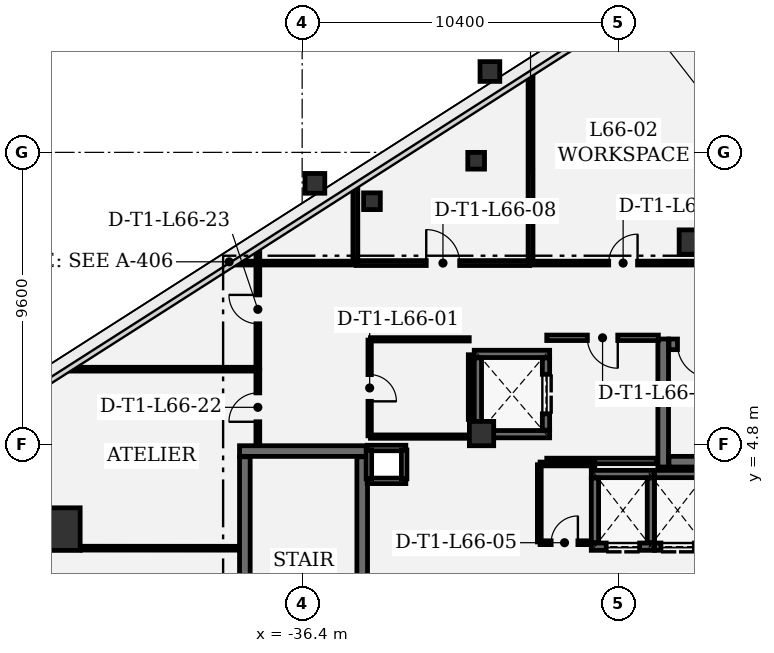
"""IFC4 building model, lengths in metres.
Left out: names, types, materials, properties, quantities, classifications, styles, units other than length and angle.
Written with IfcOpenShell. Run it as: python <this file> out.ifc"""

import sys

from ifc_helpers import new_model, si_unit, direction, frame, frame_2d, origin, origin_2d, place, context, subcontext, project, spatial, rectangle, extrude, element, fill, save


model = new_model("IFC4")
c1 = context("Model", 3, precision=1e-05, world=origin(), true_north=direction((0.0, 1.0)))
c2 = subcontext(c1, "Body", "Model", "MODEL_VIEW")
j1 = project(units=[si_unit("LENGTHUNIT", "METRE"), si_unit("PLANEANGLEUNIT", "RADIAN")], contexts=[c1])
p1 = place(None, origin())
s1 = spatial("IfcSite", under=j1, at=p1, CompositionType="ELEMENT")
p2 = place(p1, origin())
s2 = spatial("IfcBuilding", under=s1, at=p2, CompositionType="ELEMENT")
p3 = place(p2, frame((0.0, 0.0, 285.0)))
s3 = spatial("IfcBuildingStorey", under=s2, at=p3, CompositionType="ELEMENT", Elevation=285.0)
p4 = place(p3, frame((-44.403, 2.008, 0.0), z_axis=(0.0, 0.0, 1.0), x_axis=(1.0, 0.0, 0.0)))
e1 = element("IfcColumn", 1, at=p4, inside=s3, PredefinedType="COLUMN", context=c2, shape_type="SweptSolid", body=[
    extrude(rectangle(XDim=1.4, YDim=1.4, at=origin_2d()), origin(), (0.0, 0.0, 1.0), 4.2),
])
for number, where, z_axis, x_axis in (
    (2, (-23.6, 11.45, 0.0), (0.0, 0.0, 1.0), (1.0, 0.0, 0.0)),
    (3, (-30.5, 5.15, 0.0), (0.0, 0.0, 1.0), (1.0, 0.0, 0.0)),
):
    element("IfcColumn", number, at=place(p3, frame(where, z_axis=z_axis, x_axis=x_axis)), inside=s3, PredefinedType="COLUMN", context=c2, shape_type="SweptSolid", body=[
        extrude(rectangle(XDim=0.8, YDim=0.8, at=origin_2d()), origin(), (0.0, 0.0, 1.0), 4.2),
    ])
for number, where, z_axis, x_axis in (
    (4, (-35.981, 13.381, 0.0), (0.0, 0.0, 1.0), (1.0, 0.0, 0.0)),
    (5, (-30.225, 17.06, 0.0), (0.0, 0.0, 1.0), (1.0, 0.0, 0.0)),
):
    element("IfcColumn", number, at=place(p3, frame(where, z_axis=z_axis, x_axis=x_axis)), inside=s3, PredefinedType="COLUMN", context=c2, shape_type="SweptSolid", body=[
        extrude(rectangle(XDim=0.65, YDim=0.65, at=origin_2d()), origin(), (0.0, 0.0, 1.0), 4.2),
    ])
for number, where, z_axis, x_axis in (
    (6, (-34.104, 12.792, 0.0), (0.0, 0.0, 1.0), (1.0, 0.0, 0.0)),
    (7, (-30.677, 14.124, 0.0), (0.0, 0.0, 1.0), (1.0, 0.0, 0.0)),
):
    element("IfcColumn", number, at=place(p3, frame(where, z_axis=z_axis, x_axis=x_axis)), inside=s3, PredefinedType="COLUMN", context=c2, shape_type="SweptSolid", body=[
        extrude(rectangle(XDim=0.55, YDim=0.55, at=origin_2d()), origin(), (0.0, 0.0, 1.0), 4.2),
    ])
p5 = place(p3, frame((-24.525, 8.26, 0.0), z_axis=(0.0, 0.0, 1.0), x_axis=(0.0, -1.0, 0.0)))
e8 = element("IfcWall", 8, at=p5, inside=s3, PredefinedType="SHEAR", context=c2, shape_type="SweptSolid", body=[
    extrude(rectangle(XDim=4.21, YDim=0.35, at=frame_2d((2.105, 0.0))), origin(), (0.0, 0.0, 1.0), 3.91),
])
p6 = place(p3, frame((-24.335, 4.225, 0.0), z_axis=(0.0, 0.0, 1.0), x_axis=(1.0, 0.0, 0.0)))
e9 = element("IfcWall", 9, at=p6, inside=s3, PredefinedType="SHEAR", context=c2, shape_type="SweptSolid", body=[
    extrude(rectangle(XDim=8.12, YDim=0.35, at=frame_2d((4.06, 0.0))), origin(), (0.0, 0.0, 1.0), 3.91),
])
p7 = place(p3, frame((-16.215, 8.085, 0.0), z_axis=(0.0, 0.0, 1.0), x_axis=(-1.0, 0.0, 0.0)))
e10 = element("IfcWall", 10, at=p7, inside=s3, PredefinedType="SHEAR", context=c2, shape_type="SweptSolid", body=[
    extrude(rectangle(XDim=8.12, YDim=0.35, at=frame_2d((4.06, 0.0))), origin(), (0.0, 0.0, 1.0), 3.91),
])
p8 = place(p7, frame((6.74, 0.0, 0.0)))
e11 = element("IfcOpeningElement", 11, at=p8, cuts=e10, PredefinedType="OPENING", context=c2, shape_type="SweptSolid", body=[
    extrude(rectangle(XDim=1.1, YDim=2.2, at=frame_2d((0.55, 1.1))), frame((0.0, 0.185, 0.0), z_axis=(0.0, -1.0, 0.0), x_axis=(1.0, 0.0, 0.0)), (0.0, 0.0, 1.0), 0.37),
])
p9 = place(p3, frame((-34.25, 4.575, 0.0), z_axis=(0.0, 0.0, 1.0), x_axis=(-1.0, 0.0, 0.0)))
e12 = element("IfcWall", 12, at=p9, inside=s3, PredefinedType="SHEAR", context=c2, shape_type="SweptSolid", body=[
    extrude(rectangle(XDim=4.21, YDim=0.35, at=frame_2d((2.105, 0.0))), origin(), (0.0, 0.0, 1.0), 3.91),
])
for number, where, z_axis, x_axis in (
    (13, (-34.425, -4.385, 0.0), (0.0, 0.0, 1.0), (0.0, 1.0, 0.0)),
    (14, (-38.285, 4.385, 0.0), (0.0, 0.0, 1.0), (0.0, -1.0, 0.0)),
):
    element("IfcWall", number, at=place(p3, frame(where, z_axis=z_axis, x_axis=x_axis)), inside=s3, PredefinedType="SHEAR", context=c2, shape_type="SweptSolid", body=[
        extrude(rectangle(XDim=8.77, YDim=0.35, at=frame_2d((4.385, 0.0))), origin(), (0.0, 0.0, 1.0), 3.91),
    ])
for number, where, z_axis, x_axis in (
    (15, (-28.26, 5.13, 0.0), (0.0, 0.0, 1.0), (-1.0, 0.0, 0.0)),
    (16, (-30.74, 7.77, 0.0), (0.0, 0.0, 1.0), (1.0, 0.0, 0.0)),
):
    element("IfcWall", number, at=place(p3, frame(where, z_axis=z_axis, x_axis=x_axis)), inside=s3, PredefinedType="SHEAR", context=c2, shape_type="SweptSolid", body=[
        extrude(rectangle(XDim=2.48, YDim=0.24, at=frame_2d((1.24, 0.0))), origin(), (0.0, 0.0, 1.0), 3.91),
    ])
p10 = place(p3, frame((-30.62, 5.262, 0.0), z_axis=(0.0, 0.0, 1.0), x_axis=(0.0, 1.0, 0.0)))
e17 = element("IfcWall", 17, at=p10, inside=s3, PredefinedType="SHEAR", context=c2, shape_type="SweptSolid", body=[
    extrude(rectangle(XDim=2.376, YDim=0.24, at=frame_2d((1.188, 0.0))), origin(), (0.0, 0.0, 1.0), 3.91),
])
p11 = place(p3, frame((-28.38, 7.638, 0.0), z_axis=(0.0, 0.0, 1.0), x_axis=(0.0, -1.0, 0.0)))
e18 = element("IfcWall", 18, at=p11, inside=s3, PredefinedType="SHEAR", context=c2, shape_type="SweptSolid", body=[
    extrude(rectangle(XDim=2.376, YDim=0.24, at=frame_2d((1.188, 0.0))), origin(), (0.0, 0.0, 1.0), 3.91),
])
p12 = place(p11, frame((0.538, 0.0, 0.0)))
e19 = element("IfcOpeningElement", 19, at=p12, cuts=e18, PredefinedType="OPENING", context=c2, shape_type="SweptSolid", body=[
    extrude(rectangle(XDim=1.3, YDim=2.3, at=frame_2d((0.65, 1.15))), frame((0.0, 0.13, 0.0), z_axis=(0.0, -1.0, 0.0), x_axis=(1.0, 0.0, 0.0)), (0.0, 0.0, 1.0), 0.26),
])
p13 = place(p3, frame((-24.81, 1.43, 0.0), z_axis=(0.0, 0.0, 1.0), x_axis=(-1.0, 0.0, 0.0)))
e20 = element("IfcWall", 20, at=p13, inside=s3, PredefinedType="SHEAR", context=c2, shape_type="SweptSolid", body=[
    extrude(rectangle(XDim=2.08, YDim=0.24, at=frame_2d((1.04, 0.0))), origin(), (0.0, 0.0, 1.0), 3.91),
])
p14 = place(p13, frame((0.49, 0.0, 0.0)))
e21 = element("IfcOpeningElement", 21, at=p14, cuts=e20, PredefinedType="OPENING", context=c2, shape_type="SweptSolid", body=[
    extrude(rectangle(XDim=1.1, YDim=2.2, at=frame_2d((0.55, 1.1))), frame((0.0, 0.13, 0.0), z_axis=(0.0, -1.0, 0.0), x_axis=(1.0, 0.0, 0.0)), (0.0, 0.0, 1.0), 0.26),
])
p15 = place(p3, frame((-26.89, 3.82, 0.0), z_axis=(0.0, 0.0, 1.0), x_axis=(1.0, 0.0, 0.0)))
e22 = element("IfcWall", 22, at=p15, inside=s3, PredefinedType="SHEAR", context=c2, shape_type="SweptSolid", body=[
    extrude(rectangle(XDim=2.08, YDim=0.24, at=frame_2d((1.04, 0.0))), origin(), (0.0, 0.0, 1.0), 3.91),
])
for number, where, z_axis, x_axis in (
    (23, (-26.77, 1.562, 0.0), (0.0, 0.0, 1.0), (0.0, 1.0, 0.0)),
    (24, (-24.93, 3.688, 0.0), (0.0, 0.0, 1.0), (0.0, -1.0, 0.0)),
):
    element("IfcWall", number, at=place(p3, frame(where, z_axis=z_axis, x_axis=x_axis)), inside=s3, PredefinedType="SHEAR", context=c2, shape_type="SweptSolid", body=[
        extrude(rectangle(XDim=2.126, YDim=0.24, at=frame_2d((1.063, 0.0))), origin(), (0.0, 0.0, 1.0), 3.91),
    ])
p16 = place(p3, frame((-23.01, 1.43, 0.0), z_axis=(0.0, 0.0, 1.0), x_axis=(-1.0, 0.0, 0.0)))
e25 = element("IfcWall", 25, at=p16, inside=s3, PredefinedType="SHEAR", context=c2, shape_type="SweptSolid", body=[
    extrude(rectangle(XDim=1.8, YDim=0.24, at=frame_2d((0.9, 0.0))), origin(), (0.0, 0.0, 1.0), 3.91),
])
p17 = place(p16, frame((0.49, 0.0, 0.0)))
e26 = element("IfcOpeningElement", 26, at=p17, cuts=e25, PredefinedType="OPENING", context=c2, shape_type="SweptSolid", body=[
    extrude(rectangle(XDim=1.1, YDim=2.2, at=frame_2d((0.55, 1.1))), frame((0.0, 0.13, 0.0), z_axis=(0.0, -1.0, 0.0), x_axis=(1.0, 0.0, 0.0)), (0.0, 0.0, 1.0), 0.26),
])
p18 = place(p3, frame((-24.81, 3.82, 0.0), z_axis=(0.0, 0.0, 1.0), x_axis=(1.0, 0.0, 0.0)))
e27 = element("IfcWall", 27, at=p18, inside=s3, PredefinedType="SHEAR", context=c2, shape_type="SweptSolid", body=[
    extrude(rectangle(XDim=1.8, YDim=0.24, at=frame_2d((0.9, 0.0))), origin(), (0.0, 0.0, 1.0), 3.91),
])
for number, where, z_axis, x_axis in (
    (28, (-32.99, 3.595, 0.0), (0.0, 0.0, 1.0), (-1.0, 0.0, 0.0)),
    (29, (-34.26, 4.675, 0.0), (0.0, 0.0, 1.0), (1.0, 0.0, 0.0)),
):
    element("IfcWall", number, at=place(p3, frame(where, z_axis=z_axis, x_axis=x_axis)), inside=s3, PredefinedType="PARTITIONING", context=c2, shape_type="SweptSolid", body=[
        extrude(rectangle(XDim=1.27, YDim=0.18, at=frame_2d((0.635, 0.0))), origin(), (0.0, 0.0, 1.0), 3.91),
    ])
for number, where, z_axis, x_axis in (
    (30, (-34.205, 3.66, 0.0), (0.0, 0.0, 1.0), (0.0, 1.0, 0.0)),
    (31, (-33.045, 4.61, 0.0), (0.0, 0.0, 1.0), (0.0, -1.0, 0.0)),
):
    element("IfcWall", number, at=place(p3, frame(where, z_axis=z_axis, x_axis=x_axis)), inside=s3, PredefinedType="PARTITIONING", context=c2, shape_type="SweptSolid", body=[
        extrude(rectangle(XDim=0.95, YDim=0.18, at=frame_2d((0.475, 0.0))), origin(), (0.0, 0.0, 1.0), 3.91),
    ])
p19 = place(p3, frame((-28.355, 4.25, 0.0), z_axis=(0.0, 0.0, 1.0), x_axis=(1.0, 0.0, 0.0)))
e32 = element("IfcWall", 32, at=p19, inside=s3, PredefinedType="PARTITIONING", context=c2, shape_type="SweptSolid", body=[
    extrude(rectangle(XDim=3.622, YDim=0.18, at=frame_2d((1.811, 0.0))), origin(), (0.0, 0.0, 1.0), 3.91),
])
p20 = place(p3, frame((-24.684, 8.3, 0.0), z_axis=(0.0, 0.0, 1.0), x_axis=(-1.0, 0.0, 0.0)))
e33 = element("IfcWall", 33, at=p20, inside=s3, PredefinedType="PARTITIONING", context=c2, shape_type="SweptSolid", body=[
    extrude(rectangle(XDim=3.671, YDim=0.18, at=frame_2d((1.835, 0.0))), origin(), (0.0, 0.0, 1.0), 3.529),
])
p21 = place(p20, frame((1.335, 0.0, 0.0)))
e34 = element("IfcOpeningElement", 34, at=p21, cuts=e33, PredefinedType="OPENING", context=c2, shape_type="SweptSolid", body=[
    extrude(rectangle(XDim=1.0, YDim=2.15, at=frame_2d((0.5, 1.075))), frame((0.0, 0.1, 0.0), z_axis=(0.0, -1.0, 0.0), x_axis=(1.0, 0.0, 0.0)), (0.0, 0.0, 1.0), 0.2),
])
p22 = place(p3, frame((-34.18, 8.225, 0.0), z_axis=(0.0, 0.0, 1.0), x_axis=(0.0, -1.0, 0.0)))
e35 = element("IfcWall", 35, at=p22, inside=s3, PredefinedType="PARTITIONING", context=c2, shape_type="SweptSolid", body=[
    extrude(rectangle(XDim=3.15, YDim=0.11, at=frame_2d((1.575, 0.0))), origin(), (0.0, 0.0, 1.0), 3.91),
])
p23 = place(p22, frame((1.135, 0.0, 0.0)))
e36 = element("IfcOpeningElement", 36, at=p23, cuts=e35, PredefinedType="OPENING", context=c2, shape_type="SweptSolid", body=[
    extrude(rectangle(XDim=0.88, YDim=2.1, at=frame_2d((0.44, 1.05))), frame((0.0, 0.065, 0.0), z_axis=(0.0, -1.0, 0.0), x_axis=(1.0, 0.0, 0.0)), (0.0, 0.0, 1.0), 0.13),
])
p24 = place(p3, frame((-34.155, 5.05, 0.0), z_axis=(0.0, 0.0, 1.0), x_axis=(1.0, 0.0, 0.0)))
e37 = element("IfcWall", 37, at=p24, inside=s3, PredefinedType="PARTITIONING", context=c2, shape_type="SweptSolid", body=[
    extrude(rectangle(XDim=3.19, YDim=0.11, at=frame_2d((1.595, 0.0))), origin(), (0.0, 0.0, 1.0), 3.91),
])
p25 = place(p3, frame((-30.88, 5.615, 0.0), z_axis=(0.0, 0.0, 1.0), x_axis=(0.0, 1.0, 0.0)))
e38 = element("IfcWall", 38, at=p25, inside=s3, PredefinedType="PARTITIONING", context=c2, shape_type="SweptSolid", body=[
    extrude(rectangle(XDim=2.128, YDim=0.11, at=frame_2d((1.064, 0.0))), origin(), (0.0, 0.0, 1.0), 3.91),
])
p26 = place(p3, frame((-30.905, 8.25, 0.0), z_axis=(0.0, 0.0, 1.0), x_axis=(-1.0, 0.0, 0.0)))
e39 = element("IfcWall", 39, at=p26, inside=s3, PredefinedType="PARTITIONING", context=c2, shape_type="SweptSolid", body=[
    extrude(rectangle(XDim=3.25, YDim=0.11, at=frame_2d((1.625, 0.0))), origin(), (0.0, 0.0, 1.0), 3.13),
])
p27 = place(p3, frame((-28.6, 4.125, 0.0), z_axis=(0.0, 0.0, 1.0), x_axis=(0.0, -1.0, 0.0)))
e40 = element("IfcWall", 40, at=p27, inside=s3, PredefinedType="PARTITIONING", context=c2, shape_type="SweptSolid", body=[
    extrude(rectangle(XDim=2.54, YDim=0.125, at=frame_2d((1.27, 0.0))), origin(), (0.0, 0.0, 1.0), 3.91),
])
p28 = place(p3, frame((-28.575, 1.56, 0.0), z_axis=(0.0, 0.0, 1.0), x_axis=(1.0, 0.0, 0.0)))
e41 = element("IfcWall", 41, at=p28, inside=s3, PredefinedType="PARTITIONING", context=c2, shape_type="SweptSolid", body=[
    extrude(rectangle(XDim=1.609, YDim=0.125, at=frame_2d((0.805, 0.0))), origin(), (0.0, 0.0, 1.0), 3.91),
])
p29 = place(p28, frame((0.365, 0.0, 0.0)))
e42 = element("IfcOpeningElement", 42, at=p29, cuts=e41, PredefinedType="OPENING", context=c2, shape_type="SweptSolid", body=[
    extrude(rectangle(XDim=0.88, YDim=2.1, at=frame_2d((0.44, 1.05))), frame((0.0, 0.073, 0.0), z_axis=(0.0, -1.0, 0.0), x_axis=(1.0, 0.0, 0.0)), (0.0, 0.0, 1.0), 0.145),
])
p30 = place(p3, frame((-26.775, 4.15, 0.0), z_axis=(0.0, 0.0, 1.0), x_axis=(-1.0, 0.0, 0.0)))
e43 = element("IfcWall", 43, at=p30, inside=s3, PredefinedType="PARTITIONING", context=c2, shape_type="SweptSolid", body=[
    extrude(rectangle(XDim=1.8, YDim=0.125, at=frame_2d((0.9, 0.0))), origin(), (0.0, 0.0, 1.0), 3.91),
])
p31 = place(p3, frame((-34.625, 10.758, 0.0), z_axis=(0.0, 0.0, 1.0), x_axis=(1.0, 0.0, 0.0)))
e44 = element("IfcWall", 44, at=p31, inside=s3, PredefinedType="PARTITIONING", context=c2, shape_type="SweptSolid", body=[
    extrude(rectangle(XDim=5.712, YDim=0.16, at=frame_2d((2.856, 0.0))), origin(), (0.0, 0.0, 1.0), 3.13),
])
p32 = place(p31, frame((2.306, 0.0, 0.0)))
e45 = element("IfcOpeningElement", 45, at=p32, cuts=e44, PredefinedType="OPENING", context=c2, shape_type="SweptSolid", body=[
    extrude(rectangle(XDim=1.1, YDim=2.15, at=frame_2d((0.55, 1.075))), frame((0.0, 0.09, 0.0), z_axis=(0.0, -1.0, 0.0), x_axis=(1.0, 0.0, 0.0)), (0.0, 0.0, 1.0), 0.18),
])
p33 = place(p3, frame((-28.888, 10.783, 0.0), z_axis=(0.0, 0.0, 1.0), x_axis=(0.0, 1.0, 0.0)))
e46 = element("IfcWall", 46, at=p33, inside=s3, PredefinedType="PARTITIONING", context=c2, shape_type="SweptSolid", body=[
    extrude(rectangle(XDim=6.122, YDim=0.16, at=frame_2d((3.061, 0.0))), origin(), (0.0, 0.0, 1.0), 3.91),
])
p34 = place(p3, frame((-34.65, 13.222, 0.0), z_axis=(0.0, 0.0, 1.0), x_axis=(0.0, -1.0, 0.0)))
e47 = element("IfcWall", 47, at=p34, inside=s3, PredefinedType="PARTITIONING", context=c2, shape_type="SweptSolid", body=[
    extrude(rectangle(XDim=2.439, YDim=0.16, at=frame_2d((1.22, 0.0))), origin(), (0.0, 0.0, 1.0), 3.91),
])
p35 = place(p3, frame((-28.855, 10.758, 0.0), z_axis=(0.0, 0.0, 1.0), x_axis=(1.0, 0.0, 0.0)))
e48 = element("IfcWall", 48, at=p35, inside=s3, PredefinedType="PARTITIONING", context=c2, shape_type="SweptSolid", body=[
    extrude(rectangle(XDim=6.025, YDim=0.125, at=frame_2d((3.012, 0.0))), origin(), (0.0, 0.0, 1.0), 3.13),
])
p36 = place(p35, frame((2.537, 0.0, 0.0)))
e49 = element("IfcOpeningElement", 49, at=p36, cuts=e48, PredefinedType="OPENING", context=c2, shape_type="SweptSolid", body=[
    extrude(rectangle(XDim=0.95, YDim=2.15, at=frame_2d((0.475, 1.075))), frame((0.0, 0.073, 0.0), z_axis=(0.0, -1.0, 0.0), x_axis=(1.0, 0.0, 0.0)), (0.0, 0.0, 1.0), 0.145),
])
p37 = place(p3, frame((-38.493, 1.379, 0.0), z_axis=(0.0, 0.0, 1.0), x_axis=(-0.999999944823, 0.000332194363, 0.0)))
e50 = element("IfcWall", 50, at=p37, inside=s3, PredefinedType="PARTITIONING", context=c2, shape_type="SweptSolid", body=[
    extrude(rectangle(XDim=5.145, YDim=0.125, at=frame_2d((2.572, 0.0))), origin(), (0.0, 0.0, 1.0), 3.91),
])
p38 = place(p3, frame((-37.858, 4.783, 0.0), z_axis=(0.0, 0.0, 1.0), x_axis=(0.0, 1.0, 0.0)))
e51 = element("IfcWall", 51, at=p38, inside=s3, PredefinedType="PARTITIONING", context=c2, shape_type="SweptSolid", body=[
    extrude(rectangle(XDim=2.46, YDim=0.125, at=frame_2d((1.23, 0.0))), origin(), (0.0, 0.0, 1.0), 3.91),
])
p39 = place(p38, frame((0.755, 0.0, 0.0)))
e52 = element("IfcOpeningElement", 52, at=p39, cuts=e51, PredefinedType="OPENING", context=c2, shape_type="SweptSolid", body=[
    extrude(rectangle(XDim=0.95, YDim=2.15, at=frame_2d((0.475, 1.075))), frame((0.0, 0.073, 0.0), z_axis=(0.0, -1.0, 0.0), x_axis=(1.0, 0.0, 0.0)), (0.0, 0.0, 1.0), 0.145),
])
p40 = place(p3, frame((-37.883, 7.268, 0.0), z_axis=(0.0, 0.0, 1.0), x_axis=(-1.0, 0.0, 0.0)))
e53 = element("IfcWall", 53, at=p40, inside=s3, PredefinedType="PARTITIONING", context=c2, shape_type="SweptSolid", body=[
    extrude(rectangle(XDim=6.129, YDim=0.125, at=frame_2d((3.064, 0.0))), origin(), (0.0, 0.0, 1.0), 3.91),
])
p41 = place(p3, frame((-37.858, 7.301, 0.0), z_axis=(0.0, 0.0, 1.0), x_axis=(0.0, 1.0, 0.0)))
e54 = element("IfcWall", 54, at=p41, inside=s3, PredefinedType="PARTITIONING", context=c2, shape_type="SweptSolid", body=[
    extrude(rectangle(XDim=3.872, YDim=0.125, at=frame_2d((1.936, 0.0))), origin(), (0.0, 0.0, 1.0), 3.91),
])
p42 = place(p41, frame((1.461, 0.0, 0.0)))
e55 = element("IfcOpeningElement", 55, at=p42, cuts=e54, PredefinedType="OPENING", context=c2, shape_type="SweptSolid", body=[
    extrude(rectangle(XDim=0.95, YDim=2.15, at=frame_2d((0.475, 1.075))), frame((0.0, 0.073, 0.0), z_axis=(0.0, -1.0, 0.0), x_axis=(1.0, 0.0, 0.0)), (0.0, 0.0, 1.0), 0.145),
])
p43 = place(p3, frame((-34.683, 10.758, 0.0), z_axis=(0.0, 0.0, 1.0), x_axis=(-1.0, 0.0, 0.0)))
e56 = element("IfcWall", 56, at=p43, inside=s3, PredefinedType="PARTITIONING", context=c2, shape_type="SweptSolid", body=[
    extrude(rectangle(XDim=3.868, YDim=0.125, at=frame_2d((1.934, 0.0))), origin(), (0.0, 0.0, 1.0), 3.91),
])
p44 = place(p8, origin())
e57 = element("IfcDoor", 57, at=p44, inside=s3, OperationType="SINGLE_SWING_LEFT", PredefinedType="DOOR", context=c2, shape_type="SweptSolid", body=[
    extrude(rectangle(XDim=1.1, YDim=2.2, at=frame_2d((0.55, 1.1))), frame((0.0, 0.025, 0.0), z_axis=(0.0, -1.0, 0.0), x_axis=(1.0, 0.0, 0.0)), (0.0, 0.0, 1.0), 0.05),
])
fill(e11, e57)
p45 = place(p12, origin())
e58 = element("IfcDoor", 58, at=p45, inside=s3, OperationType="DOUBLE_DOOR_SLIDING", PredefinedType="DOOR", context=c2, shape_type="SweptSolid", body=[
    extrude(rectangle(XDim=1.3, YDim=2.3, at=frame_2d((0.65, 1.15))), frame((0.0, 0.025, 0.0), z_axis=(0.0, -1.0, 0.0), x_axis=(1.0, 0.0, 0.0)), (0.0, 0.0, 1.0), 0.05),
])
fill(e19, e58)
p46 = place(p14, origin())
e59 = element("IfcDoor", 59, at=p46, inside=s3, OperationType="DOUBLE_DOOR_SLIDING", PredefinedType="DOOR", context=c2, shape_type="SweptSolid", body=[
    extrude(rectangle(XDim=1.1, YDim=2.2, at=frame_2d((0.55, 1.1))), frame((0.0, 0.025, 0.0), z_axis=(0.0, -1.0, 0.0), x_axis=(1.0, 0.0, 0.0)), (0.0, 0.0, 1.0), 0.05),
])
fill(e21, e59)
p47 = place(p17, origin())
e60 = element("IfcDoor", 60, at=p47, inside=s3, OperationType="DOUBLE_DOOR_SLIDING", PredefinedType="DOOR", context=c2, shape_type="SweptSolid", body=[
    extrude(rectangle(XDim=1.1, YDim=2.2, at=frame_2d((0.55, 1.1))), frame((0.0, 0.025, 0.0), z_axis=(0.0, -1.0, 0.0), x_axis=(1.0, 0.0, 0.0)), (0.0, 0.0, 1.0), 0.05),
])
fill(e26, e60)
p48 = place(p23, origin())
e61 = element("IfcDoor", 61, at=p48, inside=s3, OperationType="SINGLE_SWING_RIGHT", PredefinedType="DOOR", context=c2, shape_type="SweptSolid", body=[
    extrude(rectangle(XDim=0.88, YDim=2.1, at=frame_2d((0.44, 1.05))), frame((0.0, 0.025, 0.0), z_axis=(0.0, -1.0, 0.0), x_axis=(1.0, 0.0, 0.0)), (0.0, 0.0, 1.0), 0.05),
])
fill(e36, e61)
p49 = place(p29, origin())
e62 = element("IfcDoor", 62, at=p49, inside=s3, OperationType="SINGLE_SWING_RIGHT", PredefinedType="DOOR", context=c2, shape_type="SweptSolid", body=[
    extrude(rectangle(XDim=0.88, YDim=2.1, at=frame_2d((0.44, 1.05))), frame((0.0, 0.025, 0.0), z_axis=(0.0, -1.0, 0.0), x_axis=(1.0, 0.0, 0.0)), (0.0, 0.0, 1.0), 0.05),
])
fill(e42, e62)
p50 = place(p32, origin())
e63 = element("IfcDoor", 63, at=p50, inside=s3, OperationType="SINGLE_SWING_LEFT", PredefinedType="DOOR", context=c2, shape_type="SweptSolid", body=[
    extrude(rectangle(XDim=1.1, YDim=2.15, at=frame_2d((0.55, 1.075))), frame((0.0, 0.025, 0.0), z_axis=(0.0, -1.0, 0.0), x_axis=(1.0, 0.0, 0.0)), (0.0, 0.0, 1.0), 0.05),
])
fill(e45, e63)
p51 = place(p36, origin())
e64 = element("IfcDoor", 64, at=p51, inside=s3, OperationType="SINGLE_SWING_RIGHT", PredefinedType="DOOR", context=c2, shape_type="SweptSolid", body=[
    extrude(rectangle(XDim=0.95, YDim=2.15, at=frame_2d((0.475, 1.075))), frame((0.0, 0.025, 0.0), z_axis=(0.0, -1.0, 0.0), x_axis=(1.0, 0.0, 0.0)), (0.0, 0.0, 1.0), 0.05),
])
fill(e49, e64)
p52 = place(p39, origin())
e65 = element("IfcDoor", 65, at=p52, inside=s3, OperationType="SINGLE_SWING_LEFT", PredefinedType="DOOR", context=c2, shape_type="SweptSolid", body=[
    extrude(rectangle(XDim=0.95, YDim=2.15, at=frame_2d((0.475, 1.075))), frame((0.0, 0.025, 0.0), z_axis=(0.0, -1.0, 0.0), x_axis=(1.0, 0.0, 0.0)), (0.0, 0.0, 1.0), 0.05),
])
fill(e52, e65)
p53 = place(p42, origin())
e66 = element("IfcDoor", 66, at=p53, inside=s3, OperationType="SINGLE_SWING_RIGHT", PredefinedType="DOOR", context=c2, shape_type="SweptSolid", body=[
    extrude(rectangle(XDim=0.95, YDim=2.15, at=frame_2d((0.475, 1.075))), frame((0.0, 0.025, 0.0), z_axis=(0.0, -1.0, 0.0), x_axis=(1.0, 0.0, 0.0)), (0.0, 0.0, 1.0), 0.05),
])
fill(e55, e66)
p54 = place(p21, origin())
e67 = element("IfcDoor", 67, at=p54, inside=s3, OperationType="SINGLE_SWING_LEFT", PredefinedType="DOOR", context=c2, shape_type="SweptSolid", body=[
    extrude(rectangle(XDim=1.0, YDim=2.15, at=frame_2d((0.5, 1.075))), frame((0.0, 0.025, 0.0), z_axis=(0.0, -1.0, 0.0), x_axis=(1.0, 0.0, 0.0)), (0.0, 0.0, 1.0), 0.05),
])
fill(e34, e67)
save(model, sys.argv[1])
